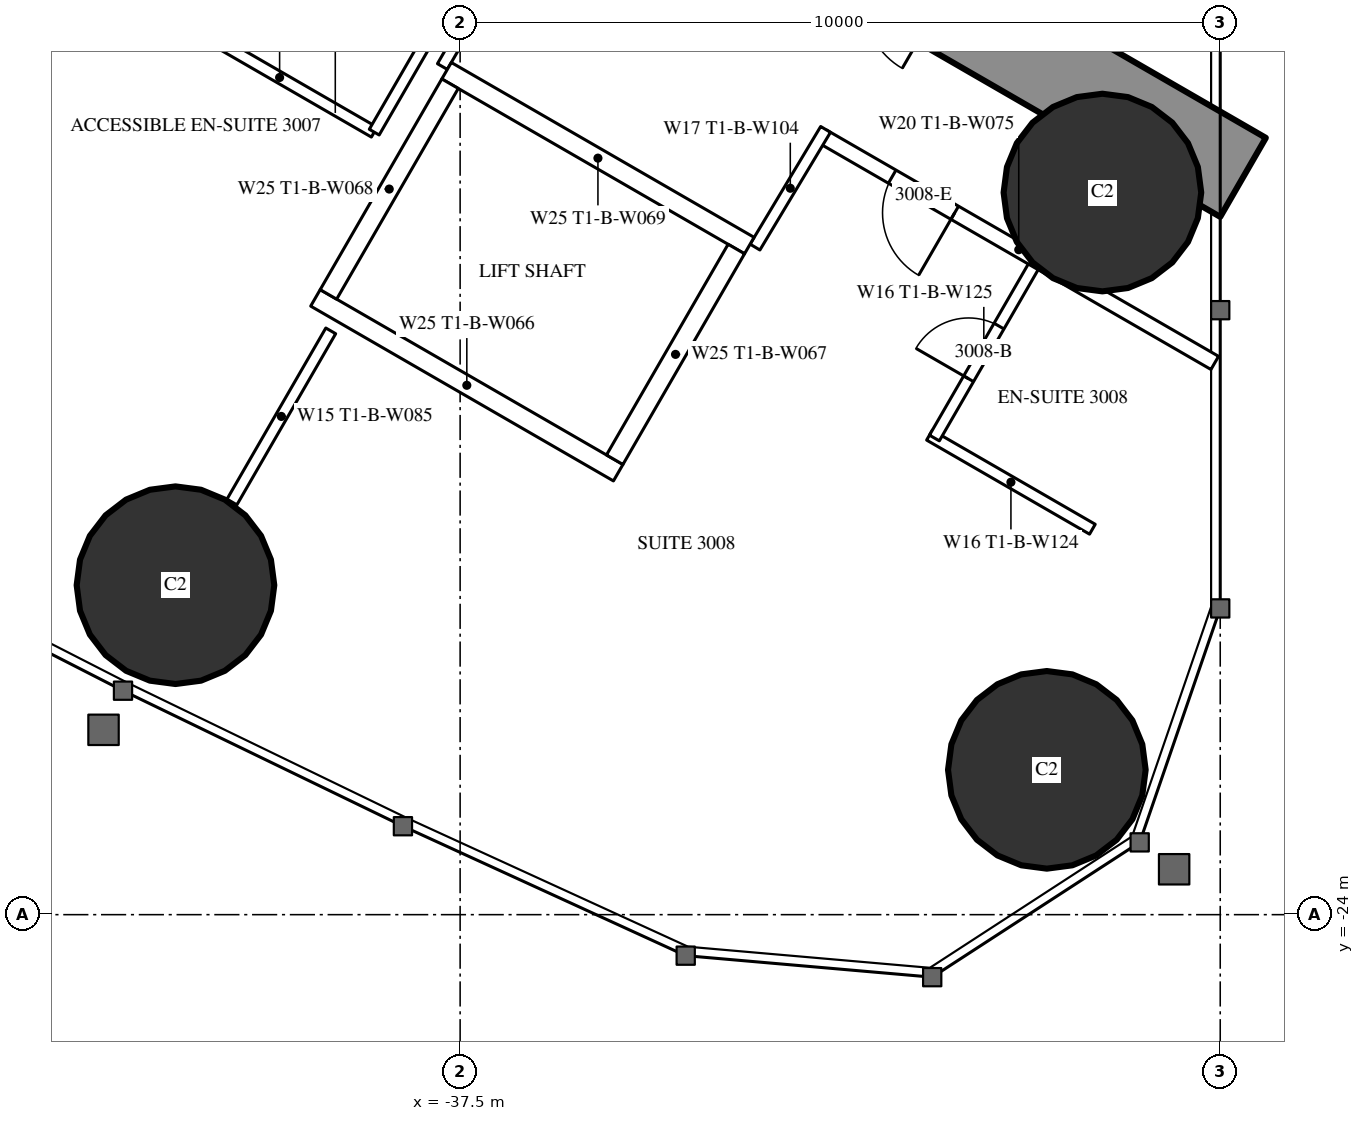
"""IFC4 building model, lengths in metres.
Left out: names, types, materials, properties, quantities, classifications, styles, units other than length and angle.
Written with IfcOpenShell. Run it as: python <this file> out.ifc"""

import sys

from ifc_helpers import new_model, si_unit, direction, frame, frame_2d, origin, origin_2d, place, context, subcontext, project, spatial, rectangle, hollow_circle, extrude, element, fill, save


model = new_model("IFC4")
c1 = context("Model", 3, precision=1e-05, world=origin(), true_north=direction((0.0, 1.0)))
c2 = subcontext(c1, "Body", "Model", "MODEL_VIEW")
j1 = project(units=[si_unit("LENGTHUNIT", "METRE"), si_unit("PLANEANGLEUNIT", "RADIAN")], contexts=[c1])
p1 = place(None, origin())
s1 = spatial("IfcSite", under=j1, at=p1, CompositionType="ELEMENT")
p2 = place(p1, origin())
s2 = spatial("IfcBuilding", under=s1, at=p2, CompositionType="ELEMENT")
p3 = place(p2, frame((0.0, 0.0, 115.1)))
s3 = spatial("IfcBuildingStorey", under=s2, at=p3, CompositionType="ELEMENT", Elevation=115.1)
for number, where, z_axis, x_axis in (
    (1, (-29.781, -22.095, 0.0), (0.0, 0.0, 1.0), (1.0, 0.0, 0.0)),
    (2, (-29.05, -14.5, 0.0), (0.0, 0.0, 1.0), (1.0, 0.0, 0.0)),
    (3, (-41.245, -19.666, 0.0), (0.0, 0.0, 1.0), (1.0, 0.0, 0.0)),
):
    element("IfcColumn", number, at=place(p3, frame(where, z_axis=z_axis, x_axis=x_axis)), inside=s3, PredefinedType="COLUMN", context=c2, shape_type="SweptSolid", body=[
        extrude(hollow_circle(Radius=1.3, WallThickness=0.1, at=origin_2d()), origin(), (0.0, 0.0, 1.0), 3.5),
    ])
p4 = place(p3, frame((-27.2, -14.3, 0.0), z_axis=(0.0, 0.0, 1.0), x_axis=(-0.866024021859, 0.500002393557, 0.0)))
e4 = element("IfcWall", 4, at=p4, inside=s3, PredefinedType="SHEAR", context=c2, shape_type="SweptSolid", body=[
    extrude(rectangle(XDim=27.907, YDim=1.2, at=frame_2d((13.954, 0.0))), origin(), (0.0, 0.0, 1.0), 3.5),
])
p5 = place(p4, frame((4.6, 0.0, 0.0)))
e5 = element("IfcOpeningElement", 5, at=p5, cuts=e4, PredefinedType="OPENING", context=c2, shape_type="SweptSolid", body=[
    extrude(rectangle(XDim=1.0, YDim=2.2, at=frame_2d((0.5, 1.1))), frame((0.0, 0.61, 0.0), z_axis=(0.0, -1.0, 0.0), x_axis=(1.0, 0.0, 0.0)), (0.0, 0.0, 1.0), 1.22),
])
p6 = place(p4, frame((13.395, 0.0, 0.0)))
e6 = element("IfcOpeningElement", 6, at=p6, cuts=e4, PredefinedType="OPENING", context=c2, shape_type="SweptSolid", body=[
    extrude(rectangle(XDim=1.8, YDim=2.2, at=frame_2d((0.9, 1.1))), frame((0.0, 0.61, 0.0), z_axis=(0.0, -1.0, 0.0), x_axis=(1.0, 0.0, 0.0)), (0.0, 0.0, 1.0), 1.22),
])
p7 = place(p3, frame((-39.202, -16.32, 0.0), z_axis=(0.0, 0.0, 1.0), x_axis=(-0.49997716683, -0.86603858612, 0.0)))
e7 = element("IfcWall", 7, at=p7, inside=s3, PredefinedType="PARTITIONING", context=c2, shape_type="SweptSolid", body=[
    extrude(rectangle(XDim=2.6, YDim=0.15, at=frame_2d((1.3, 0.0))), origin(), (0.0, 0.0, 1.0), 3.25),
])
p8 = place(p3, frame((-27.572, -16.741, 0.0), z_axis=(0.0, 0.0, 1.0), x_axis=(-0.866024464444, 0.500001626982, 0.0)))
e8 = element("IfcWall", 8, at=p8, inside=s3, PredefinedType="PARTITIONING", context=c2, shape_type="SweptSolid", body=[
    extrude(rectangle(XDim=5.955, YDim=0.2, at=frame_2d((2.978, 0.0))), origin(), (0.0, 0.0, 1.0), 3.25),
])
p9 = place(p8, frame((3.95, 0.0, 0.0)))
e9 = element("IfcOpeningElement", 9, at=p9, cuts=e8, PredefinedType="OPENING", context=c2, shape_type="SweptSolid", body=[
    extrude(rectangle(XDim=0.95, YDim=2.2, at=frame_2d((0.475, 1.1))), frame((0.0, 0.11, 0.0), z_axis=(0.0, -1.0, 0.0), x_axis=(1.0, 0.0, 0.0)), (0.0, 0.0, 1.0), 0.22),
])
p10 = place(p3, frame((-36.831, -11.28, 0.0), z_axis=(0.0, 0.0, 1.0), x_axis=(-0.499937177781, -0.866061671171, 0.0)))
e10 = element("IfcWall", 10, at=p10, inside=s3, PredefinedType="PARTITIONING", context=c2, shape_type="SweptSolid", body=[
    extrude(rectangle(XDim=1.804, YDim=0.15, at=frame_2d((0.902, 0.0))), origin(), (0.0, 0.0, 1.0), 3.25),
])
p11 = place(p3, frame((-33.621, -15.218, 0.0), z_axis=(0.0, 0.0, 1.0), x_axis=(0.514336634837, 0.857588377991, 0.0)))
e11 = element("IfcWall", 11, at=p11, inside=s3, PredefinedType="PARTITIONING", context=c2, shape_type="SweptSolid", body=[
    extrude(rectangle(XDim=1.805, YDim=0.15, at=frame_2d((0.903, 0.0))), origin(), (0.0, 0.0, 1.0), 3.25),
])
p12 = place(p3, frame((-38.63, -13.705, 0.0), z_axis=(0.0, 0.0, 1.0), x_axis=(-0.866018712932, 0.500011588718, 0.0)))
e12 = element("IfcWall", 12, at=p12, inside=s3, PredefinedType="PARTITIONING", context=c2, shape_type="SweptSolid", body=[
    extrude(rectangle(XDim=2.875, YDim=0.15, at=frame_2d((1.438, 0.0))), origin(), (0.0, 0.0, 1.0), 3.25),
])
p13 = place(p3, frame((-37.23, -11.281, 0.0), z_axis=(0.0, 0.0, 1.0), x_axis=(-0.500049511043, -0.865996816683, 0.0)))
e13 = element("IfcWall", 13, at=p13, inside=s3, PredefinedType="PARTITIONING", context=c2, shape_type="SweptSolid", body=[
    extrude(rectangle(XDim=2.8, YDim=0.15, at=frame_2d((1.4, 0.0))), origin(), (0.0, 0.0, 1.0), 3.25),
])
p14 = place(p3, frame((-29.182, -18.929, 0.0), z_axis=(0.0, 0.0, 1.0), x_axis=(-0.866006523861, 0.500032699561, 0.0)))
e14 = element("IfcWall", 14, at=p14, inside=s3, PredefinedType="PARTITIONING", context=c2, shape_type="SweptSolid", body=[
    extrude(rectangle(XDim=2.475, YDim=0.15, at=frame_2d((1.237, 0.0))), origin(), (0.0, 0.0, 1.0), 3.25),
])
p15 = place(p3, frame((-29.96, -15.478, 0.0), z_axis=(0.0, 0.0, 1.0), x_axis=(-0.500006934395, -0.866021400173, 0.0)))
e15 = element("IfcWall", 15, at=p15, inside=s3, PredefinedType="PARTITIONING", context=c2, shape_type="SweptSolid", body=[
    extrude(rectangle(XDim=2.6, YDim=0.15, at=frame_2d((1.3, 0.0))), origin(), (0.0, 0.0, 1.0), 3.25),
])
p16 = place(p15, frame((0.9, 0.0, 0.0)))
e16 = element("IfcOpeningElement", 16, at=p16, cuts=e15, PredefinedType="OPENING", context=c2, shape_type="SweptSolid", body=[
    extrude(rectangle(XDim=0.8, YDim=2.2, at=frame_2d((0.4, 1.1))), frame((0.0, 0.085, 0.0), z_axis=(0.0, -1.0, 0.0), x_axis=(1.0, 0.0, 0.0)), (0.0, 0.0, 1.0), 0.17),
])
p17 = place(p3, frame((-33.696, -15.197, 0.0), z_axis=(0.0, 0.0, 1.0), x_axis=(-0.865976953817, 0.500083908417, 0.0)))
e17 = element("IfcWall", 17, at=p17, inside=s3, PredefinedType="PARTITIONING", context=c2, shape_type="SweptSolid", body=[
    extrude(rectangle(XDim=4.599, YDim=0.25, at=frame_2d((2.3, 0.0))), origin(), (0.0, 0.0, 1.0), 3.25),
])
p18 = place(p3, frame((-35.42, -18.186, 0.0), z_axis=(0.0, 0.0, 1.0), x_axis=(-0.865990227814, 0.50006092162, 0.0)))
e18 = element("IfcWall", 18, at=p18, inside=s3, PredefinedType="PARTITIONING", context=c2, shape_type="SweptSolid", body=[
    extrude(rectangle(XDim=4.6, YDim=0.25, at=frame_2d((2.3, 0.0))), origin(), (0.0, 0.0, 1.0), 3.25),
])
p19 = place(p3, frame((-33.866, -15.243, 0.0), z_axis=(0.0, 0.0, 1.0), x_axis=(-0.499929347863, -0.866066190972, 0.0)))
e19 = element("IfcWall", 19, at=p19, inside=s3, PredefinedType="PARTITIONING", context=c2, shape_type="SweptSolid", body=[
    extrude(rectangle(XDim=3.201, YDim=0.25, at=frame_2d((1.6, 0.0))), origin(), (0.0, 0.0, 1.0), 3.25),
])
p20 = place(p3, frame((-37.633, -13.068, 0.0), z_axis=(0.0, 0.0, 1.0), x_axis=(-0.499872130319, -0.866099216793, 0.0)))
e20 = element("IfcWall", 20, at=p20, inside=s3, PredefinedType="PARTITIONING", context=c2, shape_type="SweptSolid", body=[
    extrude(rectangle(XDim=3.2, YDim=0.25, at=frame_2d((1.6, 0.0))), origin(), (0.0, 0.0, 1.0), 3.25),
])
p21 = place(p16, origin())
e21 = element("IfcDoor", 21, at=p21, inside=s3, OperationType="SINGLE_SWING_RIGHT", PredefinedType="DOOR", context=c2, shape_type="SweptSolid", body=[
    extrude(rectangle(XDim=0.8, YDim=2.2, at=frame_2d((0.4, 1.1))), frame((0.0, 0.025, 0.0), z_axis=(0.0, -1.0, 0.0), x_axis=(1.0, 0.0, 0.0)), (0.0, 0.0, 1.0), 0.05),
])
fill(e16, e21)
p22 = place(p9, origin())
e22 = element("IfcDoor", 22, at=p22, inside=s3, OperationType="SINGLE_SWING_LEFT", PredefinedType="DOOR", context=c2, shape_type="SweptSolid", body=[
    extrude(rectangle(XDim=0.95, YDim=2.2, at=frame_2d((0.475, 1.1))), frame((0.0, 0.025, 0.0), z_axis=(0.0, -1.0, 0.0), x_axis=(1.0, 0.0, 0.0)), (0.0, 0.0, 1.0), 0.05),
])
fill(e9, e22)
save(model, sys.argv[1])
